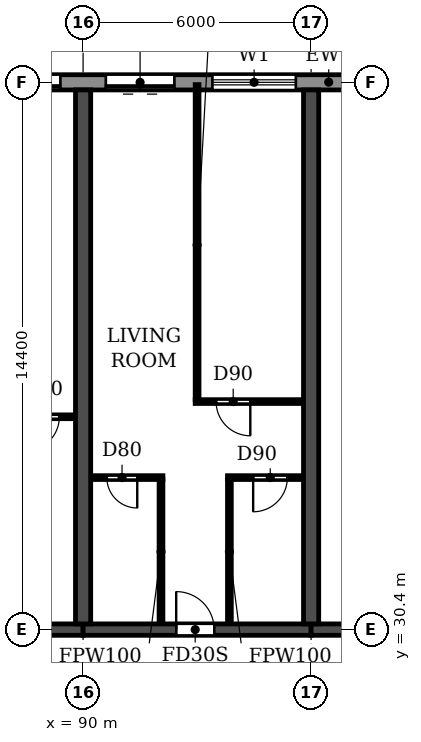
"""IFC4 building model, lengths in metres.
Left out: names, types, materials, properties, quantities, classifications, styles, units other than length and angle.
Written with IfcOpenShell. Run it as: python <this file> out.ifc"""

import sys

from ifc_helpers import new_model, si_unit, direction, frame, frame_2d, origin, place, context, subcontext, project, spatial, rectangle, extrude, element, fill, save


model = new_model("IFC4")
c1 = context("Model", 3, precision=1e-05, world=origin(), true_north=direction((0.0, 1.0)))
c2 = subcontext(c1, "Body", "Model", "MODEL_VIEW")
j1 = project(units=[si_unit("LENGTHUNIT", "METRE"), si_unit("PLANEANGLEUNIT", "RADIAN")], contexts=[c1])
p1 = place(None, origin())
s1 = spatial("IfcSite", under=j1, at=p1, CompositionType="ELEMENT")
p2 = place(p1, origin())
s2 = spatial("IfcBuilding", under=s1, at=p2, CompositionType="ELEMENT")
p3 = place(p2, frame((0.0, 0.0, 23.4)))
s3 = spatial("IfcBuildingStorey", under=s2, at=p3, CompositionType="ELEMENT", Elevation=23.4)
for number, where, z_axis, x_axis in (
    (1, (90.0, 30.55, 0.0), (0.0, 0.0, 1.0), (0.0, 1.0, 0.0)),
    (2, (96.0, 30.55, 0.0), (0.0, 0.0, 1.0), (0.0, 1.0, 0.0)),
):
    element("IfcWall", number, at=place(p3, frame(where, z_axis=z_axis, x_axis=x_axis)), inside=s3, PredefinedType="SHEAR", context=c2, shape_type="SweptSolid", body=[
        extrude(rectangle(XDim=14.05, YDim=0.4, at=frame_2d((7.025, 0.0))), origin(), (0.0, 0.0, 1.0), 3.05),
    ])
p4 = place(p3, frame((84.0, 30.4, 0.0), z_axis=(0.0, 0.0, 1.0), x_axis=(1.0, 0.0, 0.0)))
e3 = element("IfcWall", 3, at=p4, inside=s3, PredefinedType="SHEAR", context=c2, shape_type="SweptSolid", body=[
    extrude(rectangle(XDim=6.0, YDim=0.3, at=frame_2d((3.0, 0.0))), origin(), (0.0, 0.0, 1.0), 2.45),
])
p5 = place(p4, frame((2.45, 0.0, 0.0)))
e4 = element("IfcOpeningElement", 4, at=p5, cuts=e3, PredefinedType="OPENING", context=c2, shape_type="SweptSolid", body=[
    extrude(rectangle(XDim=1.0, YDim=2.1, at=frame_2d((0.5, 1.05))), frame((0.0, 0.16, 0.0), z_axis=(0.0, -1.0, 0.0), x_axis=(1.0, 0.0, 0.0)), (0.0, 0.0, 1.0), 0.32),
])
p6 = place(p3, frame((90.0, 30.4, 0.0), z_axis=(0.0, 0.0, 1.0), x_axis=(1.0, 0.0, 0.0)))
e5 = element("IfcWall", 5, at=p6, inside=s3, PredefinedType="SHEAR", context=c2, shape_type="SweptSolid", body=[
    extrude(rectangle(XDim=6.0, YDim=0.3, at=frame_2d((3.0, 0.0))), origin(), (0.0, 0.0, 1.0), 2.45),
])
p7 = place(p6, frame((2.45, 0.0, 0.0)))
e6 = element("IfcOpeningElement", 6, at=p7, cuts=e5, PredefinedType="OPENING", context=c2, shape_type="SweptSolid", body=[
    extrude(rectangle(XDim=1.0, YDim=2.1, at=frame_2d((0.5, 1.05))), frame((0.0, 0.16, 0.0), z_axis=(0.0, -1.0, 0.0), x_axis=(1.0, 0.0, 0.0)), (0.0, 0.0, 1.0), 0.32),
])
p8 = place(p3, frame((96.0, 30.4, 0.0), z_axis=(0.0, 0.0, 1.0), x_axis=(1.0, 0.0, 0.0)))
e7 = element("IfcWall", 7, at=p8, inside=s3, PredefinedType="SHEAR", context=c2, shape_type="SweptSolid", body=[
    extrude(rectangle(XDim=5.8, YDim=0.3, at=frame_2d((2.9, 0.0))), origin(), (0.0, 0.0, 1.0), 2.45),
])
p9 = place(p8, frame((2.5, 0.0, 0.0)))
e8 = element("IfcOpeningElement", 8, at=p9, cuts=e7, PredefinedType="OPENING", context=c2, shape_type="SweptSolid", body=[
    extrude(rectangle(XDim=1.0, YDim=2.1, at=frame_2d((0.5, 1.05))), frame((0.0, 0.16, 0.0), z_axis=(0.0, -1.0, 0.0), x_axis=(1.0, 0.0, 0.0)), (0.0, 0.0, 1.0), 0.32),
])
p10 = place(p3, frame((97.317, 44.8, 0.0), z_axis=(0.0, 0.0, 1.0), x_axis=(-1.0, 0.0, 0.0)))
e9 = element("IfcWall", 9, at=p10, inside=s3, PredefinedType="STANDARD", context=c2, shape_type="SweptSolid", body=[
    extrude(rectangle(XDim=92.634, YDim=0.4, at=frame_2d((46.317, 0.0))), origin(), (0.0, 0.0, 1.0), 3.05),
])
p11 = place(p10, frame((88.717, 0.0, 0.9)))
e10 = element("IfcOpeningElement", 10, at=p11, cuts=e9, PredefinedType="OPENING", context=c2, shape_type="SweptSolid", body=[
    extrude(rectangle(XDim=2.2, YDim=1.5, at=frame_2d((1.1, 0.75))), frame((0.0, 0.21, 0.0), z_axis=(0.0, -1.0, 0.0), x_axis=(1.0, 0.0, 0.0)), (0.0, 0.0, 1.0), 0.42),
])
p12 = place(p10, frame((85.917, 0.0, 0.0)))
e11 = element("IfcOpeningElement", 11, at=p12, cuts=e9, PredefinedType="OPENING", context=c2, shape_type="SweptSolid", body=[
    extrude(rectangle(XDim=1.8, YDim=2.4, at=frame_2d((0.9, 1.2))), frame((0.0, 0.21, 0.0), z_axis=(0.0, -1.0, 0.0), x_axis=(1.0, 0.0, 0.0)), (0.0, 0.0, 1.0), 0.42),
])
p13 = place(p10, frame((82.717, 0.0, 0.9)))
e12 = element("IfcOpeningElement", 12, at=p13, cuts=e9, PredefinedType="OPENING", context=c2, shape_type="SweptSolid", body=[
    extrude(rectangle(XDim=2.2, YDim=1.5, at=frame_2d((1.1, 0.75))), frame((0.0, 0.21, 0.0), z_axis=(0.0, -1.0, 0.0), x_axis=(1.0, 0.0, 0.0)), (0.0, 0.0, 1.0), 0.42),
])
p14 = place(p10, frame((79.717, 0.0, 0.9)))
e13 = element("IfcOpeningElement", 13, at=p14, cuts=e9, PredefinedType="OPENING", context=c2, shape_type="SweptSolid", body=[
    extrude(rectangle(XDim=2.2, YDim=1.5, at=frame_2d((1.1, 0.75))), frame((0.0, 0.21, 0.0), z_axis=(0.0, -1.0, 0.0), x_axis=(1.0, 0.0, 0.0)), (0.0, 0.0, 1.0), 0.42),
])
p15 = place(p10, frame((76.917, 0.0, 0.0)))
e14 = element("IfcOpeningElement", 14, at=p15, cuts=e9, PredefinedType="OPENING", context=c2, shape_type="SweptSolid", body=[
    extrude(rectangle(XDim=1.8, YDim=2.4, at=frame_2d((0.9, 1.2))), frame((0.0, 0.21, 0.0), z_axis=(0.0, -1.0, 0.0), x_axis=(1.0, 0.0, 0.0)), (0.0, 0.0, 1.0), 0.42),
])
p16 = place(p10, frame((73.717, 0.0, 0.9)))
e15 = element("IfcOpeningElement", 15, at=p16, cuts=e9, PredefinedType="OPENING", context=c2, shape_type="SweptSolid", body=[
    extrude(rectangle(XDim=2.2, YDim=1.5, at=frame_2d((1.1, 0.75))), frame((0.0, 0.21, 0.0), z_axis=(0.0, -1.0, 0.0), x_axis=(1.0, 0.0, 0.0)), (0.0, 0.0, 1.0), 0.42),
])
p17 = place(p10, frame((70.717, 0.0, 0.9)))
e16 = element("IfcOpeningElement", 16, at=p17, cuts=e9, PredefinedType="OPENING", context=c2, shape_type="SweptSolid", body=[
    extrude(rectangle(XDim=2.2, YDim=1.5, at=frame_2d((1.1, 0.75))), frame((0.0, 0.21, 0.0), z_axis=(0.0, -1.0, 0.0), x_axis=(1.0, 0.0, 0.0)), (0.0, 0.0, 1.0), 0.42),
])
p18 = place(p10, frame((67.717, 0.0, 0.9)))
e17 = element("IfcOpeningElement", 17, at=p18, cuts=e9, PredefinedType="OPENING", context=c2, shape_type="SweptSolid", body=[
    extrude(rectangle(XDim=2.2, YDim=1.5, at=frame_2d((1.1, 0.75))), frame((0.0, 0.21, 0.0), z_axis=(0.0, -1.0, 0.0), x_axis=(1.0, 0.0, 0.0)), (0.0, 0.0, 1.0), 0.42),
])
p19 = place(p10, frame((64.917, 0.0, 0.0)))
e18 = element("IfcOpeningElement", 18, at=p19, cuts=e9, PredefinedType="OPENING", context=c2, shape_type="SweptSolid", body=[
    extrude(rectangle(XDim=1.8, YDim=2.4, at=frame_2d((0.9, 1.2))), frame((0.0, 0.21, 0.0), z_axis=(0.0, -1.0, 0.0), x_axis=(1.0, 0.0, 0.0)), (0.0, 0.0, 1.0), 0.42),
])
p20 = place(p10, frame((61.717, 0.0, 0.9)))
e19 = element("IfcOpeningElement", 19, at=p20, cuts=e9, PredefinedType="OPENING", context=c2, shape_type="SweptSolid", body=[
    extrude(rectangle(XDim=2.2, YDim=1.5, at=frame_2d((1.1, 0.75))), frame((0.0, 0.21, 0.0), z_axis=(0.0, -1.0, 0.0), x_axis=(1.0, 0.0, 0.0)), (0.0, 0.0, 1.0), 0.42),
])
p21 = place(p10, frame((58.717, 0.0, 0.9)))
e20 = element("IfcOpeningElement", 20, at=p21, cuts=e9, PredefinedType="OPENING", context=c2, shape_type="SweptSolid", body=[
    extrude(rectangle(XDim=2.2, YDim=1.5, at=frame_2d((1.1, 0.75))), frame((0.0, 0.21, 0.0), z_axis=(0.0, -1.0, 0.0), x_axis=(1.0, 0.0, 0.0)), (0.0, 0.0, 1.0), 0.42),
])
p22 = place(p10, frame((55.917, 0.0, 0.0)))
e21 = element("IfcOpeningElement", 21, at=p22, cuts=e9, PredefinedType="OPENING", context=c2, shape_type="SweptSolid", body=[
    extrude(rectangle(XDim=1.8, YDim=2.4, at=frame_2d((0.9, 1.2))), frame((0.0, 0.21, 0.0), z_axis=(0.0, -1.0, 0.0), x_axis=(1.0, 0.0, 0.0)), (0.0, 0.0, 1.0), 0.42),
])
p23 = place(p10, frame((52.917, 0.0, 0.0)))
e22 = element("IfcOpeningElement", 22, at=p23, cuts=e9, PredefinedType="OPENING", context=c2, shape_type="SweptSolid", body=[
    extrude(rectangle(XDim=1.8, YDim=2.4, at=frame_2d((0.9, 1.2))), frame((0.0, 0.21, 0.0), z_axis=(0.0, -1.0, 0.0), x_axis=(1.0, 0.0, 0.0)), (0.0, 0.0, 1.0), 0.42),
])
p24 = place(p10, frame((49.717, 0.0, 0.9)))
e23 = element("IfcOpeningElement", 23, at=p24, cuts=e9, PredefinedType="OPENING", context=c2, shape_type="SweptSolid", body=[
    extrude(rectangle(XDim=2.2, YDim=1.5, at=frame_2d((1.1, 0.75))), frame((0.0, 0.21, 0.0), z_axis=(0.0, -1.0, 0.0), x_axis=(1.0, 0.0, 0.0)), (0.0, 0.0, 1.0), 0.42),
])
p25 = place(p10, frame((46.917, 0.0, 0.0)))
e24 = element("IfcOpeningElement", 24, at=p25, cuts=e9, PredefinedType="OPENING", context=c2, shape_type="SweptSolid", body=[
    extrude(rectangle(XDim=1.8, YDim=2.4, at=frame_2d((0.9, 1.2))), frame((0.0, 0.21, 0.0), z_axis=(0.0, -1.0, 0.0), x_axis=(1.0, 0.0, 0.0)), (0.0, 0.0, 1.0), 0.42),
])
p26 = place(p10, frame((43.717, 0.0, 0.9)))
e25 = element("IfcOpeningElement", 25, at=p26, cuts=e9, PredefinedType="OPENING", context=c2, shape_type="SweptSolid", body=[
    extrude(rectangle(XDim=2.2, YDim=1.5, at=frame_2d((1.1, 0.75))), frame((0.0, 0.21, 0.0), z_axis=(0.0, -1.0, 0.0), x_axis=(1.0, 0.0, 0.0)), (0.0, 0.0, 1.0), 0.42),
])
p27 = place(p10, frame((40.717, 0.0, 0.9)))
e26 = element("IfcOpeningElement", 26, at=p27, cuts=e9, PredefinedType="OPENING", context=c2, shape_type="SweptSolid", body=[
    extrude(rectangle(XDim=2.2, YDim=1.5, at=frame_2d((1.1, 0.75))), frame((0.0, 0.21, 0.0), z_axis=(0.0, -1.0, 0.0), x_axis=(1.0, 0.0, 0.0)), (0.0, 0.0, 1.0), 0.42),
])
p28 = place(p10, frame((37.917, 0.0, 0.0)))
e27 = element("IfcOpeningElement", 27, at=p28, cuts=e9, PredefinedType="OPENING", context=c2, shape_type="SweptSolid", body=[
    extrude(rectangle(XDim=1.8, YDim=2.4, at=frame_2d((0.9, 1.2))), frame((0.0, 0.21, 0.0), z_axis=(0.0, -1.0, 0.0), x_axis=(1.0, 0.0, 0.0)), (0.0, 0.0, 1.0), 0.42),
])
p29 = place(p10, frame((34.917, 0.0, 0.0)))
e28 = element("IfcOpeningElement", 28, at=p29, cuts=e9, PredefinedType="OPENING", context=c2, shape_type="SweptSolid", body=[
    extrude(rectangle(XDim=1.8, YDim=2.4, at=frame_2d((0.9, 1.2))), frame((0.0, 0.21, 0.0), z_axis=(0.0, -1.0, 0.0), x_axis=(1.0, 0.0, 0.0)), (0.0, 0.0, 1.0), 0.42),
])
p30 = place(p10, frame((31.717, 0.0, 0.9)))
e29 = element("IfcOpeningElement", 29, at=p30, cuts=e9, PredefinedType="OPENING", context=c2, shape_type="SweptSolid", body=[
    extrude(rectangle(XDim=2.2, YDim=1.5, at=frame_2d((1.1, 0.75))), frame((0.0, 0.21, 0.0), z_axis=(0.0, -1.0, 0.0), x_axis=(1.0, 0.0, 0.0)), (0.0, 0.0, 1.0), 0.42),
])
p31 = place(p10, frame((28.717, 0.0, 0.9)))
e30 = element("IfcOpeningElement", 30, at=p31, cuts=e9, PredefinedType="OPENING", context=c2, shape_type="SweptSolid", body=[
    extrude(rectangle(XDim=2.2, YDim=1.5, at=frame_2d((1.1, 0.75))), frame((0.0, 0.21, 0.0), z_axis=(0.0, -1.0, 0.0), x_axis=(1.0, 0.0, 0.0)), (0.0, 0.0, 1.0), 0.42),
])
p32 = place(p10, frame((25.717, 0.0, 0.9)))
e31 = element("IfcOpeningElement", 31, at=p32, cuts=e9, PredefinedType="OPENING", context=c2, shape_type="SweptSolid", body=[
    extrude(rectangle(XDim=2.2, YDim=1.5, at=frame_2d((1.1, 0.75))), frame((0.0, 0.21, 0.0), z_axis=(0.0, -1.0, 0.0), x_axis=(1.0, 0.0, 0.0)), (0.0, 0.0, 1.0), 0.42),
])
p33 = place(p10, frame((22.717, 0.0, 0.9)))
e32 = element("IfcOpeningElement", 32, at=p33, cuts=e9, PredefinedType="OPENING", context=c2, shape_type="SweptSolid", body=[
    extrude(rectangle(XDim=2.2, YDim=1.5, at=frame_2d((1.1, 0.75))), frame((0.0, 0.21, 0.0), z_axis=(0.0, -1.0, 0.0), x_axis=(1.0, 0.0, 0.0)), (0.0, 0.0, 1.0), 0.42),
])
p34 = place(p10, frame((19.917, 0.0, 0.0)))
e33 = element("IfcOpeningElement", 33, at=p34, cuts=e9, PredefinedType="OPENING", context=c2, shape_type="SweptSolid", body=[
    extrude(rectangle(XDim=1.8, YDim=2.4, at=frame_2d((0.9, 1.2))), frame((0.0, 0.21, 0.0), z_axis=(0.0, -1.0, 0.0), x_axis=(1.0, 0.0, 0.0)), (0.0, 0.0, 1.0), 0.42),
])
p35 = place(p10, frame((16.717, 0.0, 0.9)))
e34 = element("IfcOpeningElement", 34, at=p35, cuts=e9, PredefinedType="OPENING", context=c2, shape_type="SweptSolid", body=[
    extrude(rectangle(XDim=2.2, YDim=1.5, at=frame_2d((1.1, 0.75))), frame((0.0, 0.21, 0.0), z_axis=(0.0, -1.0, 0.0), x_axis=(1.0, 0.0, 0.0)), (0.0, 0.0, 1.0), 0.42),
])
p36 = place(p10, frame((13.717, 0.0, 0.9)))
e35 = element("IfcOpeningElement", 35, at=p36, cuts=e9, PredefinedType="OPENING", context=c2, shape_type="SweptSolid", body=[
    extrude(rectangle(XDim=2.2, YDim=1.5, at=frame_2d((1.1, 0.75))), frame((0.0, 0.21, 0.0), z_axis=(0.0, -1.0, 0.0), x_axis=(1.0, 0.0, 0.0)), (0.0, 0.0, 1.0), 0.42),
])
p37 = place(p10, frame((10.717, 0.0, 0.9)))
e36 = element("IfcOpeningElement", 36, at=p37, cuts=e9, PredefinedType="OPENING", context=c2, shape_type="SweptSolid", body=[
    extrude(rectangle(XDim=2.2, YDim=1.5, at=frame_2d((1.1, 0.75))), frame((0.0, 0.21, 0.0), z_axis=(0.0, -1.0, 0.0), x_axis=(1.0, 0.0, 0.0)), (0.0, 0.0, 1.0), 0.42),
])
p38 = place(p10, frame((7.917, 0.0, 0.0)))
e37 = element("IfcOpeningElement", 37, at=p38, cuts=e9, PredefinedType="OPENING", context=c2, shape_type="SweptSolid", body=[
    extrude(rectangle(XDim=1.8, YDim=2.4, at=frame_2d((0.9, 1.2))), frame((0.0, 0.21, 0.0), z_axis=(0.0, -1.0, 0.0), x_axis=(1.0, 0.0, 0.0)), (0.0, 0.0, 1.0), 0.42),
])
p39 = place(p10, frame((4.917, 0.0, 0.0)))
e38 = element("IfcOpeningElement", 38, at=p39, cuts=e9, PredefinedType="OPENING", context=c2, shape_type="SweptSolid", body=[
    extrude(rectangle(XDim=1.8, YDim=2.4, at=frame_2d((0.9, 1.2))), frame((0.0, 0.21, 0.0), z_axis=(0.0, -1.0, 0.0), x_axis=(1.0, 0.0, 0.0)), (0.0, 0.0, 1.0), 0.42),
])
p40 = place(p10, frame((1.717, 0.0, 0.9)))
e39 = element("IfcOpeningElement", 39, at=p40, cuts=e9, PredefinedType="OPENING", context=c2, shape_type="SweptSolid", body=[
    extrude(rectangle(XDim=2.2, YDim=1.5, at=frame_2d((1.1, 0.75))), frame((0.0, 0.21, 0.0), z_axis=(0.0, -1.0, 0.0), x_axis=(1.0, 0.0, 0.0)), (0.0, 0.0, 1.0), 0.42),
])
p41 = place(p3, frame((90.21, 34.4, 0.0), z_axis=(0.0, 0.0, 1.0), x_axis=(1.0, 0.0, 0.0)))
e40 = element("IfcWall", 40, at=p41, inside=s3, PredefinedType="PARTITIONING", context=c2, shape_type="SweptSolid", body=[
    extrude(rectangle(XDim=1.89, YDim=0.1, at=frame_2d((0.945, 0.0))), origin(), (0.0, 0.0, 1.0), 3.05),
])
p42 = place(p41, frame((0.415, 0.0, 0.0)))
e41 = element("IfcOpeningElement", 41, at=p42, cuts=e40, PredefinedType="OPENING", context=c2, shape_type="SweptSolid", body=[
    extrude(rectangle(XDim=0.8, YDim=2.1, at=frame_2d((0.4, 1.05))), frame((0.0, 0.06, 0.0), z_axis=(0.0, -1.0, 0.0), x_axis=(1.0, 0.0, 0.0)), (0.0, 0.0, 1.0), 0.12),
])
p43 = place(p3, frame((93.8, 34.4, 0.0), z_axis=(0.0, 0.0, 1.0), x_axis=(1.0, 0.0, 0.0)))
e42 = element("IfcWall", 42, at=p43, inside=s3, PredefinedType="PARTITIONING", context=c2, shape_type="SweptSolid", body=[
    extrude(rectangle(XDim=1.99, YDim=0.1, at=frame_2d((0.995, 0.0))), origin(), (0.0, 0.0, 1.0), 3.05),
])
p44 = place(p43, frame((0.675, 0.0, 0.0)))
e43 = element("IfcOpeningElement", 43, at=p44, cuts=e42, PredefinedType="OPENING", context=c2, shape_type="SweptSolid", body=[
    extrude(rectangle(XDim=0.9, YDim=2.1, at=frame_2d((0.45, 1.05))), frame((0.0, 0.06, 0.0), z_axis=(0.0, -1.0, 0.0), x_axis=(1.0, 0.0, 0.0)), (0.0, 0.0, 1.0), 0.12),
])
p45 = place(p3, frame((87.8, 36.0, 0.0), z_axis=(0.0, 0.0, 1.0), x_axis=(1.0, 0.0, 0.0)))
e44 = element("IfcWall", 44, at=p45, inside=s3, PredefinedType="PARTITIONING", context=c2, shape_type="SweptSolid", body=[
    extrude(rectangle(XDim=1.99, YDim=0.1, at=frame_2d((0.995, 0.0))), origin(), (0.0, 0.0, 1.0), 3.05),
])
p46 = place(p45, frame((0.675, 0.0, 0.0)))
e45 = element("IfcOpeningElement", 45, at=p46, cuts=e44, PredefinedType="OPENING", context=c2, shape_type="SweptSolid", body=[
    extrude(rectangle(XDim=0.9, YDim=2.1, at=frame_2d((0.45, 1.05))), frame((0.0, 0.06, 0.0), z_axis=(0.0, -1.0, 0.0), x_axis=(1.0, 0.0, 0.0)), (0.0, 0.0, 1.0), 0.12),
])
p47 = place(p3, frame((92.95, 36.4, 0.0), z_axis=(0.0, 0.0, 1.0), x_axis=(1.0, 0.0, 0.0)))
e46 = element("IfcWall", 46, at=p47, inside=s3, PredefinedType="PARTITIONING", context=c2, shape_type="SweptSolid", body=[
    extrude(rectangle(XDim=2.84, YDim=0.1, at=frame_2d((1.42, 0.0))), origin(), (0.0, 0.0, 1.0), 3.05),
])
p48 = place(p47, frame((0.55, 0.0, 0.0)))
e47 = element("IfcOpeningElement", 47, at=p48, cuts=e46, PredefinedType="OPENING", context=c2, shape_type="SweptSolid", body=[
    extrude(rectangle(XDim=0.9, YDim=2.1, at=frame_2d((0.45, 1.05))), frame((0.0, 0.06, 0.0), z_axis=(0.0, -1.0, 0.0), x_axis=(1.0, 0.0, 0.0)), (0.0, 0.0, 1.0), 0.12),
])
p49 = place(p3, frame((92.05, 30.56, 0.0), z_axis=(0.0, 0.0, 1.0), x_axis=(0.0, 1.0, 0.0)))
e48 = element("IfcWall", 48, at=p49, inside=s3, PredefinedType="PARTITIONING", context=c2, shape_type="SweptSolid", body=[
    extrude(rectangle(XDim=3.79, YDim=0.1, at=frame_2d((1.895, 0.0))), origin(), (0.0, 0.0, 1.0), 3.05),
])
p50 = place(p3, frame((93.0, 36.45, 0.0), z_axis=(0.0, 0.0, 1.0), x_axis=(0.0, 1.0, 0.0)))
e49 = element("IfcWall", 49, at=p50, inside=s3, PredefinedType="PARTITIONING", context=c2, shape_type="SweptSolid", body=[
    extrude(rectangle(XDim=8.29, YDim=0.1, at=frame_2d((4.145, 0.0))), origin(), (0.0, 0.0, 1.0), 3.05),
])
p51 = place(p3, frame((93.85, 30.56, 0.0), z_axis=(0.0, 0.0, 1.0), x_axis=(0.0, 1.0, 0.0)))
e50 = element("IfcWall", 50, at=p51, inside=s3, PredefinedType="PARTITIONING", context=c2, shape_type="SweptSolid", body=[
    extrude(rectangle(XDim=3.79, YDim=0.1, at=frame_2d((1.895, 0.0))), origin(), (0.0, 0.0, 1.0), 3.05),
])
p52 = place(p38, origin())
e51 = element("IfcDoor", 51, at=p52, inside=s3, OperationType="DOUBLE_DOOR_SLIDING", PredefinedType="DOOR", context=c2, shape_type="SweptSolid", body=[
    extrude(rectangle(XDim=1.8, YDim=2.4, at=frame_2d((0.9, 1.2))), frame((0.0, 0.025, 0.0), z_axis=(0.0, -1.0, 0.0), x_axis=(1.0, 0.0, 0.0)), (0.0, 0.0, 1.0), 0.05),
])
fill(e37, e51)
p53 = place(p39, origin())
e52 = element("IfcDoor", 52, at=p53, inside=s3, OperationType="DOUBLE_DOOR_SLIDING", PredefinedType="DOOR", context=c2, shape_type="SweptSolid", body=[
    extrude(rectangle(XDim=1.8, YDim=2.4, at=frame_2d((0.9, 1.2))), frame((0.0, 0.025, 0.0), z_axis=(0.0, -1.0, 0.0), x_axis=(1.0, 0.0, 0.0)), (0.0, 0.0, 1.0), 0.05),
])
fill(e38, e52)
p54 = place(p40, origin())
e53 = element("IfcWindow", 53, at=p54, inside=s3, PartitioningType="DOUBLE_PANEL_HORIZONTAL", PredefinedType="WINDOW", context=c2, shape_type="SweptSolid", body=[
    extrude(rectangle(XDim=2.2, YDim=1.5, at=frame_2d((1.1, 0.75))), frame((0.0, 0.03, 0.0), z_axis=(0.0, -1.0, 0.0), x_axis=(1.0, 0.0, 0.0)), (0.0, 0.0, 1.0), 0.06),
])
fill(e39, e53)
p55 = place(p46, frame((0.9, 0.0, 0.0), z_axis=(0.0, 0.0, 1.0), x_axis=(-1.0, 0.0, 0.0)))
e54 = element("IfcDoor", 54, at=p55, inside=s3, OperationType="SINGLE_SWING_RIGHT", PredefinedType="DOOR", context=c2, shape_type="SweptSolid", body=[
    extrude(rectangle(XDim=0.9, YDim=2.1, at=frame_2d((0.45, 1.05))), frame((0.0, 0.025, 0.0), z_axis=(0.0, -1.0, 0.0), x_axis=(1.0, 0.0, 0.0)), (0.0, 0.0, 1.0), 0.05),
])
fill(e45, e54)
p56 = place(p42, frame((0.8, 0.0, 0.0), z_axis=(0.0, 0.0, 1.0), x_axis=(-1.0, 0.0, 0.0)))
e55 = element("IfcDoor", 55, at=p56, inside=s3, OperationType="SINGLE_SWING_LEFT", PredefinedType="DOOR", context=c2, shape_type="SweptSolid", body=[
    extrude(rectangle(XDim=0.8, YDim=2.1, at=frame_2d((0.4, 1.05))), frame((0.0, 0.025, 0.0), z_axis=(0.0, -1.0, 0.0), x_axis=(1.0, 0.0, 0.0)), (0.0, 0.0, 1.0), 0.05),
])
fill(e41, e55)
p57 = place(p7, origin())
e56 = element("IfcDoor", 56, at=p57, inside=s3, OperationType="SINGLE_SWING_LEFT", PredefinedType="DOOR", context=c2, shape_type="SweptSolid", body=[
    extrude(rectangle(XDim=1.0, YDim=2.1, at=frame_2d((0.5, 1.05))), frame((0.0, 0.025, 0.0), z_axis=(0.0, -1.0, 0.0), x_axis=(1.0, 0.0, 0.0)), (0.0, 0.0, 1.0), 0.05),
])
fill(e6, e56)
p58 = place(p48, frame((0.9, 0.0, 0.0), z_axis=(0.0, 0.0, 1.0), x_axis=(-1.0, 0.0, 0.0)))
e57 = element("IfcDoor", 57, at=p58, inside=s3, OperationType="SINGLE_SWING_LEFT", PredefinedType="DOOR", context=c2, shape_type="SweptSolid", body=[
    extrude(rectangle(XDim=0.9, YDim=2.1, at=frame_2d((0.45, 1.05))), frame((0.0, 0.025, 0.0), z_axis=(0.0, -1.0, 0.0), x_axis=(1.0, 0.0, 0.0)), (0.0, 0.0, 1.0), 0.05),
])
fill(e47, e57)
p59 = place(p44, frame((0.9, 0.0, 0.0), z_axis=(0.0, 0.0, 1.0), x_axis=(-1.0, 0.0, 0.0)))
e58 = element("IfcDoor", 58, at=p59, inside=s3, OperationType="SINGLE_SWING_RIGHT", PredefinedType="DOOR", context=c2, shape_type="SweptSolid", body=[
    extrude(rectangle(XDim=0.9, YDim=2.1, at=frame_2d((0.45, 1.05))), frame((0.0, 0.025, 0.0), z_axis=(0.0, -1.0, 0.0), x_axis=(1.0, 0.0, 0.0)), (0.0, 0.0, 1.0), 0.05),
])
fill(e43, e58)
save(model, sys.argv[1])
